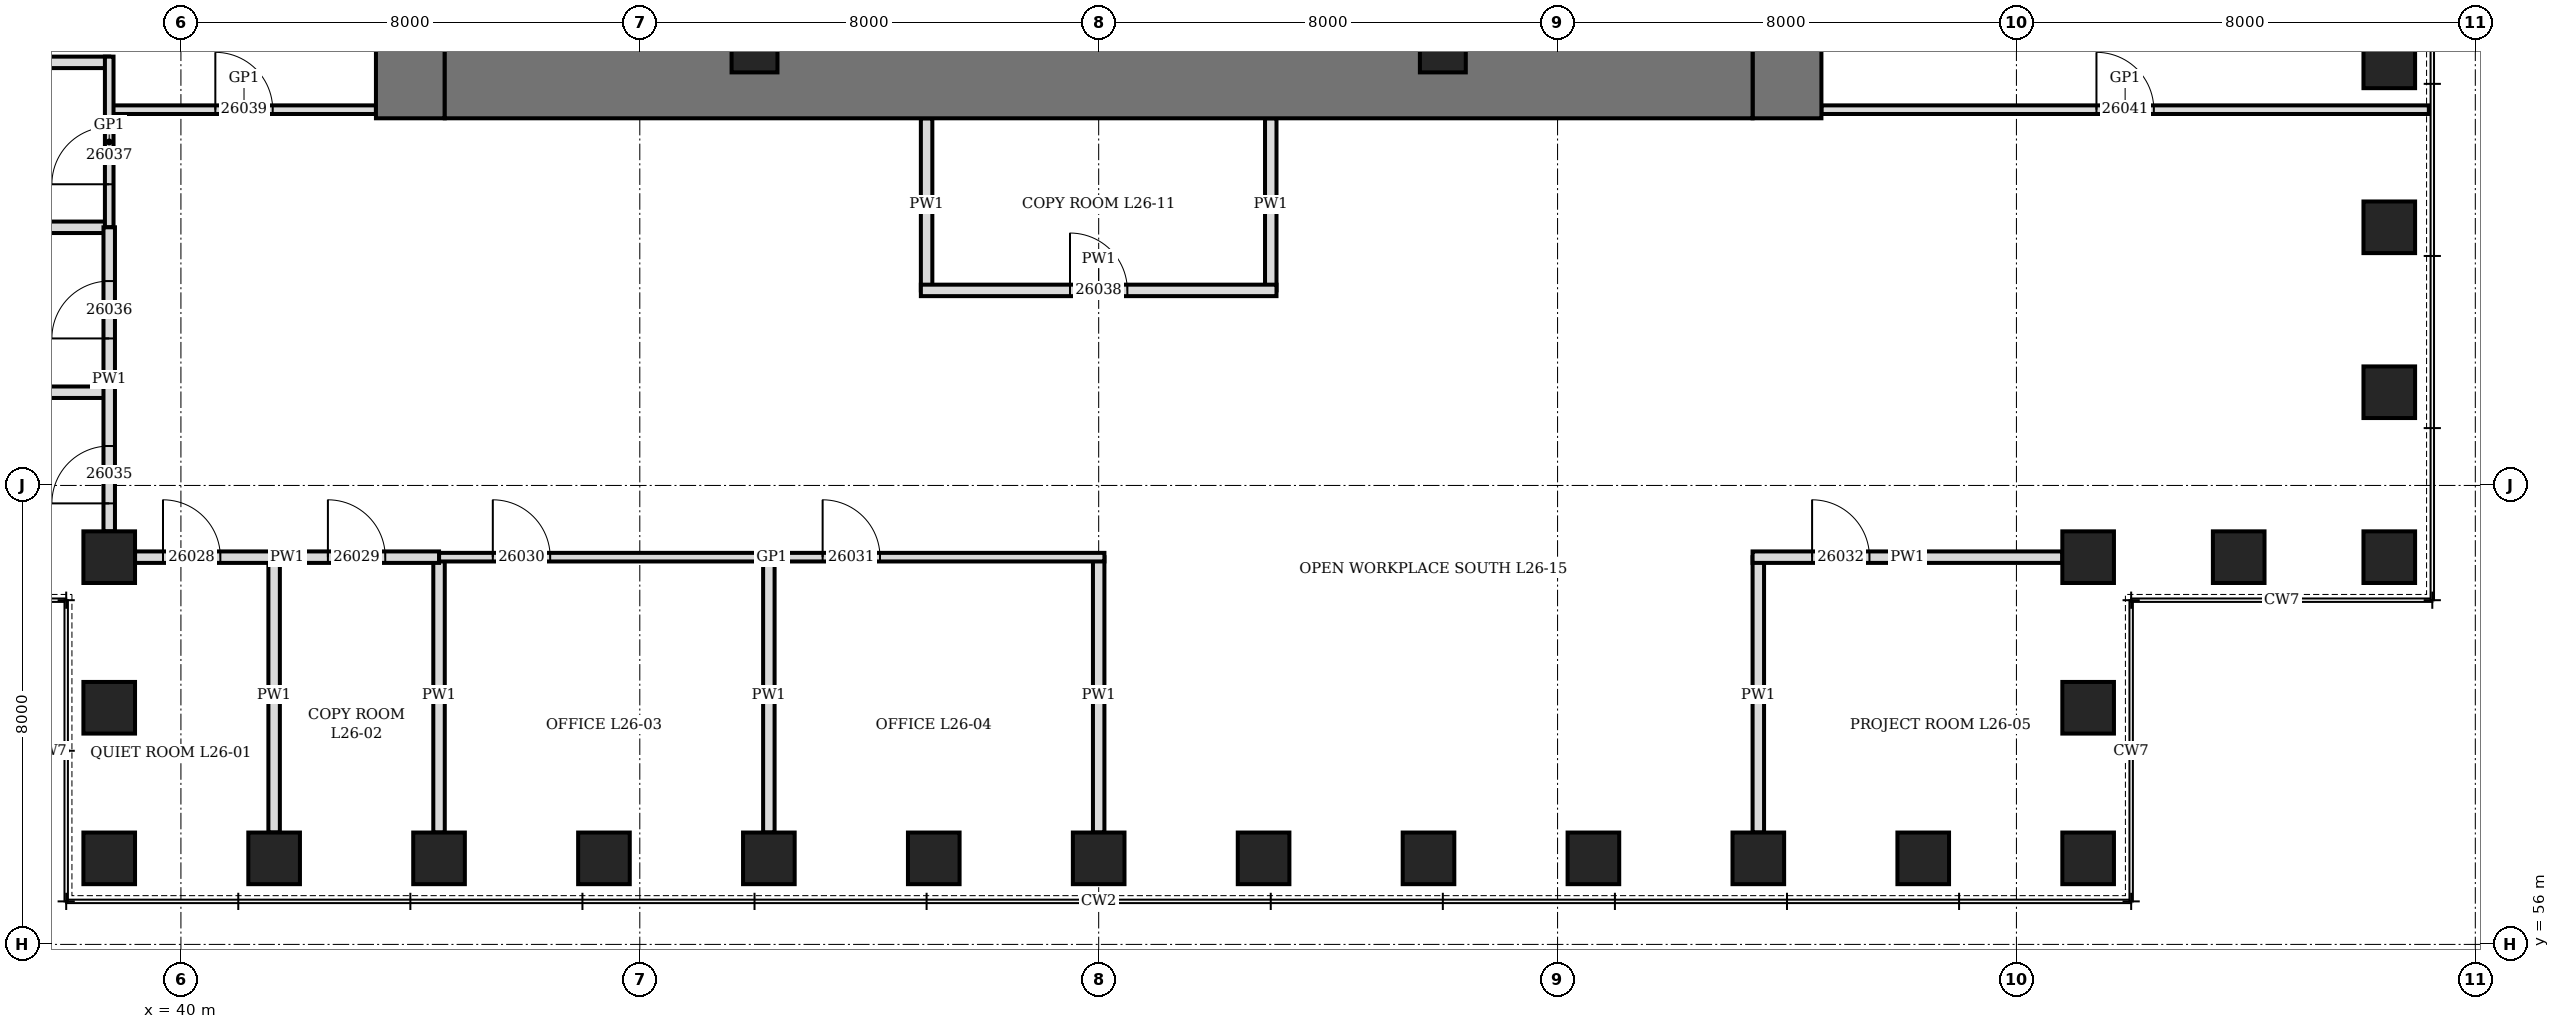
"""IFC4 building model, lengths in metres.
Left out: names, types, materials, properties, quantities, classifications, styles, units other than length and angle.
Written with IfcOpenShell. Run it as: python <this file> out.ifc"""

import sys

from ifc_helpers import new_model, si_unit, direction, frame, frame_2d, origin, origin_2d, place, context, subcontext, project, spatial, rectangle, hollow_rectangle, extrude, element, fill, save


model = new_model("IFC4")
c1 = context("Model", 3, precision=1e-05, world=origin(), true_north=direction((0.0, 1.0)))
c2 = subcontext(c1, "Body", "Model", "MODEL_VIEW")
j1 = project(units=[si_unit("LENGTHUNIT", "METRE"), si_unit("PLANEANGLEUNIT", "RADIAN")], contexts=[c1])
p1 = place(None, origin())
s1 = spatial("IfcSite", under=j1, at=p1, CompositionType="ELEMENT")
p2 = place(p1, origin())
s2 = spatial("IfcBuilding", under=s1, at=p2, CompositionType="ELEMENT")
p3 = place(p2, frame((0.0, 0.0, 120.7)))
s3 = spatial("IfcBuildingStorey", under=s2, at=p3, CompositionType="ELEMENT", Elevation=120.7)
for number, where, z_axis, x_axis in (
    (1, (38.75, 57.5, 0.0), (0.0, 0.0, 1.0), (1.0, 0.0, 0.0)),
    (2, (41.625, 57.5, 0.0), (0.0, 0.0, 1.0), (1.0, 0.0, 0.0)),
    (3, (44.5, 57.5, 0.0), (0.0, 0.0, 1.0), (1.0, 0.0, 0.0)),
    (4, (47.375, 57.5, 0.0), (0.0, 0.0, 1.0), (1.0, 0.0, 0.0)),
    (5, (50.25, 57.5, 0.0), (0.0, 0.0, 1.0), (1.0, 0.0, 0.0)),
    (6, (53.125, 57.5, 0.0), (0.0, 0.0, 1.0), (1.0, 0.0, 0.0)),
    (7, (56.0, 57.5, 0.0), (0.0, 0.0, 1.0), (1.0, 0.0, 0.0)),
    (8, (58.875, 57.5, 0.0), (0.0, 0.0, 1.0), (1.0, 0.0, 0.0)),
    (9, (61.75, 57.5, 0.0), (0.0, 0.0, 1.0), (1.0, 0.0, 0.0)),
    (10, (64.625, 57.5, 0.0), (0.0, 0.0, 1.0), (1.0, 0.0, 0.0)),
    (11, (67.5, 57.5, 0.0), (0.0, 0.0, 1.0), (1.0, 0.0, 0.0)),
    (12, (70.375, 57.5, 0.0), (0.0, 0.0, 1.0), (1.0, 0.0, 0.0)),
    (13, (73.25, 57.5, 0.0), (0.0, 0.0, 1.0), (0.0, 1.0, 0.0)),
    (14, (73.25, 60.125, 0.0), (0.0, 0.0, 1.0), (0.0, 1.0, 0.0)),
    (15, (73.25, 62.75, 0.0), (0.0, 0.0, 1.0), (1.0, 0.0, 0.0)),
    (16, (75.875, 62.75, 0.0), (0.0, 0.0, 1.0), (1.0, 0.0, 0.0)),
    (17, (78.5, 62.75, 0.0), (0.0, 0.0, 1.0), (0.0, 1.0, 0.0)),
    (18, (78.5, 65.625, 0.0), (0.0, 0.0, 1.0), (0.0, 1.0, 0.0)),
    (19, (78.5, 68.5, 0.0), (0.0, 0.0, 1.0), (0.0, 1.0, 0.0)),
    (20, (78.5, 71.375, 0.0), (0.0, 0.0, 1.0), (0.0, 1.0, 0.0)),
    (21, (38.75, 62.75, 0.0), (0.0, 0.0, 1.0), (0.0, 1.0, 0.0)),
    (22, (38.75, 60.125, 0.0), (0.0, 0.0, 1.0), (0.0, 1.0, 0.0)),
):
    element("IfcColumn", number, at=place(p3, frame(where, z_axis=z_axis, x_axis=x_axis)), inside=s3, PredefinedType="COLUMN", context=c2, shape_type="SweptSolid", body=[
        extrude(hollow_rectangle(XDim=0.9, YDim=0.9, WallThickness=0.15, at=origin_2d()), origin(), (0.0, 0.0, 1.0), 4.2),
    ])
p4 = place(p3, frame((44.0, 70.4, 0.0), z_axis=(0.0, 0.0, 1.0), x_axis=(0.0, 1.0, 0.0)))
e23 = element("IfcWall", 23, at=p4, inside=s3, PredefinedType="SHEAR", context=c2, shape_type="SweptSolid", body=[
    extrude(rectangle(XDim=19.2, YDim=1.2, at=frame_2d((9.6, 0.0))), origin(), (0.0, 0.0, 1.0), 4.2),
])
p5 = place(p4, frame((8.6, 0.0, 0.0)))
e24 = element("IfcOpeningElement", 24, at=p5, cuts=e23, PredefinedType="OPENING", context=c2, shape_type="SweptSolid", body=[
    extrude(rectangle(XDim=2.0, YDim=2.4, at=frame_2d((1.0, 1.2))), frame((0.0, 0.61, 0.0), z_axis=(0.0, -1.0, 0.0), x_axis=(1.0, 0.0, 0.0)), (0.0, 0.0, 1.0), 1.22),
])
p6 = place(p3, frame((68.0, 70.4, 0.0), z_axis=(0.0, 0.0, 1.0), x_axis=(0.0, 1.0, 0.0)))
e25 = element("IfcWall", 25, at=p6, inside=s3, PredefinedType="SHEAR", context=c2, shape_type="SweptSolid", body=[
    extrude(rectangle(XDim=19.2, YDim=1.2, at=frame_2d((9.6, 0.0))), origin(), (0.0, 0.0, 1.0), 4.2),
])
p7 = place(p6, frame((8.6, 0.0, 0.0)))
e26 = element("IfcOpeningElement", 26, at=p7, cuts=e25, PredefinedType="OPENING", context=c2, shape_type="SweptSolid", body=[
    extrude(rectangle(XDim=2.0, YDim=2.4, at=frame_2d((1.0, 1.2))), frame((0.0, 0.61, 0.0), z_axis=(0.0, -1.0, 0.0), x_axis=(1.0, 0.0, 0.0)), (0.0, 0.0, 1.0), 1.22),
])
p8 = place(p3, frame((44.6, 71.0, 0.0), z_axis=(0.0, 0.0, 1.0), x_axis=(1.0, 0.0, 0.0)))
e27 = element("IfcWall", 27, at=p8, inside=s3, PredefinedType="SHEAR", context=c2, shape_type="SweptSolid", body=[
    extrude(rectangle(XDim=22.8, YDim=1.2, at=frame_2d((11.4, 0.0))), origin(), (0.0, 0.0, 1.0), 4.2),
])
for number, where, z_axis, x_axis in (
    (28, (50.0, 71.6, 0.0), (0.0, 0.0, 1.0), (1.0, 0.0, 0.0)),
    (29, (62.0, 71.6, 0.0), (0.0, 0.0, 1.0), (1.0, 0.0, 0.0)),
):
    element("IfcColumn", number, at=place(p3, frame(where, z_axis=z_axis, x_axis=x_axis)), inside=s3, PredefinedType="COLUMN", context=c2, shape_type="SweptSolid", body=[
        extrude(hollow_rectangle(XDim=0.8, YDim=0.8, WallThickness=0.1, at=origin_2d()), origin(), (0.0, 0.0, 1.0), 4.2),
    ])
p9 = place(p3, frame((41.625, 57.95, 0.0), z_axis=(0.0, 0.0, 1.0), x_axis=(0.0, 1.0, 0.0)))
e30 = element("IfcWall", 30, at=p9, inside=s3, PredefinedType="PARTITIONING", context=c2, shape_type="SweptSolid", body=[
    extrude(rectangle(XDim=4.8, YDim=0.2, at=frame_2d((2.4, 0.0))), origin(), (0.0, 0.0, 1.0), 3.428),
])
p10 = place(p3, frame((44.5, 57.95, 0.0), z_axis=(0.0, 0.0, 1.0), x_axis=(0.0, 1.0, 0.0)))
e31 = element("IfcWall", 31, at=p10, inside=s3, PredefinedType="PARTITIONING", context=c2, shape_type="SweptSolid", body=[
    extrude(rectangle(XDim=4.8, YDim=0.2, at=frame_2d((2.4, 0.0))), origin(), (0.0, 0.0, 1.0), 2.74),
])
for number, where, z_axis, x_axis in (
    (32, (50.25, 57.95, 0.0), (0.0, 0.0, 1.0), (0.0, 1.0, 0.0)),
    (33, (56.0, 57.95, 0.0), (0.0, 0.0, 1.0), (0.0, 1.0, 0.0)),
):
    element("IfcWall", number, at=place(p3, frame(where, z_axis=z_axis, x_axis=x_axis)), inside=s3, PredefinedType="PARTITIONING", context=c2, shape_type="SweptSolid", body=[
        extrude(rectangle(XDim=4.8, YDim=0.2, at=frame_2d((2.4, 0.0))), origin(), (0.0, 0.0, 1.0), 3.278),
    ])
p11 = place(p3, frame((67.5, 57.95, 0.0), z_axis=(0.0, 0.0, 1.0), x_axis=(0.0, 1.0, 0.0)))
e34 = element("IfcWall", 34, at=p11, inside=s3, PredefinedType="PARTITIONING", context=c2, shape_type="SweptSolid", body=[
    extrude(rectangle(XDim=4.8, YDim=0.2, at=frame_2d((2.4, 0.0))), origin(), (0.0, 0.0, 1.0), 2.74),
])
for number, where, z_axis, x_axis in (
    (35, (33.95, 65.625, 0.0), (0.0, 0.0, 1.0), (1.0, 0.0, 0.0)),
    (36, (33.95, 68.5, 0.0), (0.0, 0.0, 1.0), (1.0, 0.0, 0.0)),
    (37, (33.95, 71.375, 0.0), (0.0, 0.0, 1.0), (1.0, 0.0, 0.0)),
):
    element("IfcWall", number, at=place(p3, frame(where, z_axis=z_axis, x_axis=x_axis)), inside=s3, PredefinedType="PARTITIONING", context=c2, shape_type="SweptSolid", body=[
        extrude(rectangle(XDim=4.8, YDim=0.2, at=frame_2d((2.4, 0.0))), origin(), (0.0, 0.0, 1.0), 3.428),
    ])
for number, where, z_axis, x_axis in (
    (38, (53.0, 67.4, 0.0), (0.0, 0.0, 1.0), (0.0, 1.0, 0.0)),
    (39, (59.0, 67.4, 0.0), (0.0, 0.0, 1.0), (0.0, 1.0, 0.0)),
):
    element("IfcWall", number, at=place(p3, frame(where, z_axis=z_axis, x_axis=x_axis)), inside=s3, PredefinedType="PARTITIONING", context=c2, shape_type="SweptSolid", body=[
        extrude(rectangle(XDim=3.0, YDim=0.2, at=frame_2d((1.5, 0.0))), origin(), (0.0, 0.0, 1.0), 3.278),
    ])
p12 = place(p3, frame((44.5, 62.75, 0.0), z_axis=(0.0, 0.0, 1.0), x_axis=(1.0, 0.0, 0.0)))
e40 = element("IfcWall", 40, at=p12, inside=s3, PredefinedType="PARTITIONING", context=c2, shape_type="SweptSolid", body=[
    extrude(rectangle(XDim=11.6, YDim=0.15, at=frame_2d((5.8, 0.0))), origin(), (0.0, 0.0, 1.0), 4.04),
])
p13 = place(p12, frame((0.938, 0.0, 0.0)))
e41 = element("IfcOpeningElement", 41, at=p13, cuts=e40, PredefinedType="OPENING", context=c2, shape_type="SweptSolid", body=[
    extrude(rectangle(XDim=1.0, YDim=2.1, at=frame_2d((0.5, 1.05))), frame((0.0, 0.085, 0.0), z_axis=(0.0, -1.0, 0.0), x_axis=(1.0, 0.0, 0.0)), (0.0, 0.0, 1.0), 0.17),
])
p14 = place(p12, frame((6.688, 0.0, 0.0)))
e42 = element("IfcOpeningElement", 42, at=p14, cuts=e40, PredefinedType="OPENING", context=c2, shape_type="SweptSolid", body=[
    extrude(rectangle(XDim=1.0, YDim=2.1, at=frame_2d((0.5, 1.05))), frame((0.0, 0.085, 0.0), z_axis=(0.0, -1.0, 0.0), x_axis=(1.0, 0.0, 0.0)), (0.0, 0.0, 1.0), 0.17),
])
p15 = place(p3, frame((39.2, 62.75, 0.0), z_axis=(0.0, 0.0, 1.0), x_axis=(1.0, 0.0, 0.0)))
e43 = element("IfcWall", 43, at=p15, inside=s3, PredefinedType="PARTITIONING", context=c2, shape_type="SweptSolid", body=[
    extrude(rectangle(XDim=5.3, YDim=0.2, at=frame_2d((2.65, 0.0))), origin(), (0.0, 0.0, 1.0), 4.04),
])
p16 = place(p15, frame((0.488, 0.0, 0.0)))
e44 = element("IfcOpeningElement", 44, at=p16, cuts=e43, PredefinedType="OPENING", context=c2, shape_type="SweptSolid", body=[
    extrude(rectangle(XDim=1.0, YDim=2.1, at=frame_2d((0.5, 1.05))), frame((0.0, 0.11, 0.0), z_axis=(0.0, -1.0, 0.0), x_axis=(1.0, 0.0, 0.0)), (0.0, 0.0, 1.0), 0.22),
])
p17 = place(p15, frame((3.363, 0.0, 0.0)))
e45 = element("IfcOpeningElement", 45, at=p17, cuts=e43, PredefinedType="OPENING", context=c2, shape_type="SweptSolid", body=[
    extrude(rectangle(XDim=1.0, YDim=2.1, at=frame_2d((0.5, 1.05))), frame((0.0, 0.11, 0.0), z_axis=(0.0, -1.0, 0.0), x_axis=(1.0, 0.0, 0.0)), (0.0, 0.0, 1.0), 0.22),
])
p18 = place(p3, frame((67.4, 62.75, 0.0), z_axis=(0.0, 0.0, 1.0), x_axis=(1.0, 0.0, 0.0)))
e46 = element("IfcWall", 46, at=p18, inside=s3, PredefinedType="PARTITIONING", context=c2, shape_type="SweptSolid", body=[
    extrude(rectangle(XDim=5.4, YDim=0.2, at=frame_2d((2.7, 0.0))), origin(), (0.0, 0.0, 1.0), 4.04),
])
p19 = place(p18, frame((1.038, 0.0, 0.0)))
e47 = element("IfcOpeningElement", 47, at=p19, cuts=e46, PredefinedType="OPENING", context=c2, shape_type="SweptSolid", body=[
    extrude(rectangle(XDim=1.0, YDim=2.1, at=frame_2d((0.5, 1.05))), frame((0.0, 0.11, 0.0), z_axis=(0.0, -1.0, 0.0), x_axis=(1.0, 0.0, 0.0)), (0.0, 0.0, 1.0), 0.22),
])
p20 = place(p3, frame((52.9, 67.4, 0.0), z_axis=(0.0, 0.0, 1.0), x_axis=(1.0, 0.0, 0.0)))
e48 = element("IfcWall", 48, at=p20, inside=s3, PredefinedType="PARTITIONING", context=c2, shape_type="SweptSolid", body=[
    extrude(rectangle(XDim=6.2, YDim=0.2, at=frame_2d((3.1, 0.0))), origin(), (0.0, 0.0, 1.0), 4.04),
])
p21 = place(p20, frame((2.6, 0.0, 0.0)))
e49 = element("IfcOpeningElement", 49, at=p21, cuts=e48, PredefinedType="OPENING", context=c2, shape_type="SweptSolid", body=[
    extrude(rectangle(XDim=1.0, YDim=2.1, at=frame_2d((0.5, 1.05))), frame((0.0, 0.11, 0.0), z_axis=(0.0, -1.0, 0.0), x_axis=(1.0, 0.0, 0.0)), (0.0, 0.0, 1.0), 0.22),
])
p22 = place(p3, frame((38.8, 70.55, 0.0), z_axis=(0.0, 0.0, 1.0), x_axis=(1.0, 0.0, 0.0)))
e50 = element("IfcWall", 50, at=p22, inside=s3, PredefinedType="PARTITIONING", context=c2, shape_type="SweptSolid", body=[
    extrude(rectangle(XDim=4.6, YDim=0.15, at=frame_2d((2.3, 0.0))), origin(), (0.0, 0.0, 1.0), 4.04),
])
p23 = place(p22, frame((1.8, 0.0, 0.0)))
e51 = element("IfcOpeningElement", 51, at=p23, cuts=e50, PredefinedType="OPENING", context=c2, shape_type="SweptSolid", body=[
    extrude(rectangle(XDim=1.0, YDim=2.4, at=frame_2d((0.5, 1.2))), frame((0.0, 0.085, 0.0), z_axis=(0.0, -1.0, 0.0), x_axis=(1.0, 0.0, 0.0)), (0.0, 0.0, 1.0), 0.17),
])
p24 = place(p3, frame((68.6, 70.55, 0.0), z_axis=(0.0, 0.0, 1.0), x_axis=(1.0, 0.0, 0.0)))
e52 = element("IfcWall", 52, at=p24, inside=s3, PredefinedType="PARTITIONING", context=c2, shape_type="SweptSolid", body=[
    extrude(rectangle(XDim=10.59, YDim=0.15, at=frame_2d((5.295, 0.0))), origin(), (0.0, 0.0, 1.0), 4.04),
])
p25 = place(p24, frame((4.795, 0.0, 0.0)))
e53 = element("IfcOpeningElement", 53, at=p25, cuts=e52, PredefinedType="OPENING", context=c2, shape_type="SweptSolid", body=[
    extrude(rectangle(XDim=1.0, YDim=2.4, at=frame_2d((0.5, 1.2))), frame((0.0, 0.085, 0.0), z_axis=(0.0, -1.0, 0.0), x_axis=(1.0, 0.0, 0.0)), (0.0, 0.0, 1.0), 0.17),
])
p26 = place(p3, frame((38.75, 68.5, 0.0), z_axis=(0.0, 0.0, 1.0), x_axis=(0.0, 1.0, 0.0)))
e54 = element("IfcWall", 54, at=p26, inside=s3, PredefinedType="PARTITIONING", context=c2, shape_type="SweptSolid", body=[
    extrude(rectangle(XDim=2.975, YDim=0.15, at=frame_2d((1.488, 0.0))), origin(), (0.0, 0.0, 1.0), 4.04),
])
p27 = place(p26, frame((0.75, 0.0, 0.0)))
e55 = element("IfcOpeningElement", 55, at=p27, cuts=e54, PredefinedType="OPENING", context=c2, shape_type="SweptSolid", body=[
    extrude(rectangle(XDim=1.0, YDim=2.4, at=frame_2d((0.5, 1.2))), frame((0.0, 0.085, 0.0), z_axis=(0.0, -1.0, 0.0), x_axis=(1.0, 0.0, 0.0)), (0.0, 0.0, 1.0), 0.17),
])
p28 = place(p3, frame((38.75, 63.2, 0.0), z_axis=(0.0, 0.0, 1.0), x_axis=(0.0, 1.0, 0.0)))
e56 = element("IfcWall", 56, at=p28, inside=s3, PredefinedType="PARTITIONING", context=c2, shape_type="SweptSolid", body=[
    extrude(rectangle(XDim=5.3, YDim=0.2, at=frame_2d((2.65, 0.0))), origin(), (0.0, 0.0, 1.0), 4.04),
])
p29 = place(p28, frame((0.488, 0.0, 0.0)))
e57 = element("IfcOpeningElement", 57, at=p29, cuts=e56, PredefinedType="OPENING", context=c2, shape_type="SweptSolid", body=[
    extrude(rectangle(XDim=1.0, YDim=2.1, at=frame_2d((0.5, 1.05))), frame((0.0, 0.11, 0.0), z_axis=(0.0, -1.0, 0.0), x_axis=(1.0, 0.0, 0.0)), (0.0, 0.0, 1.0), 0.22),
])
p30 = place(p28, frame((3.363, 0.0, 0.0)))
e58 = element("IfcOpeningElement", 58, at=p30, cuts=e56, PredefinedType="OPENING", context=c2, shape_type="SweptSolid", body=[
    extrude(rectangle(XDim=1.0, YDim=2.1, at=frame_2d((0.5, 1.05))), frame((0.0, 0.11, 0.0), z_axis=(0.0, -1.0, 0.0), x_axis=(1.0, 0.0, 0.0)), (0.0, 0.0, 1.0), 0.22),
])
p31 = place(p16, origin())
e59 = element("IfcDoor", 59, at=p31, inside=s3, OperationType="SINGLE_SWING_LEFT", PredefinedType="DOOR", context=c2, shape_type="SweptSolid", body=[
    extrude(rectangle(XDim=1.0, YDim=2.1, at=frame_2d((0.5, 1.05))), frame((0.0, 0.1, 0.0), z_axis=(0.0, -1.0, 0.0), x_axis=(1.0, 0.0, 0.0)), (0.0, 0.0, 1.0), 0.199),
])
fill(e44, e59)
p32 = place(p17, origin())
e60 = element("IfcDoor", 60, at=p32, inside=s3, OperationType="SINGLE_SWING_LEFT", PredefinedType="DOOR", context=c2, shape_type="SweptSolid", body=[
    extrude(rectangle(XDim=1.0, YDim=2.1, at=frame_2d((0.5, 1.05))), frame((0.0, 0.1, 0.0), z_axis=(0.0, -1.0, 0.0), x_axis=(1.0, 0.0, 0.0)), (0.0, 0.0, 1.0), 0.199),
])
fill(e45, e60)
p33 = place(p13, origin())
e61 = element("IfcDoor", 61, at=p33, inside=s3, OperationType="SINGLE_SWING_LEFT", PredefinedType="DOOR", context=c2, shape_type="SweptSolid", body=[
    extrude(rectangle(XDim=1.0, YDim=2.1, at=frame_2d((0.5, 1.05))), frame((0.0, 0.075, 0.0), z_axis=(0.0, -1.0, 0.0), x_axis=(1.0, 0.0, 0.0)), (0.0, 0.0, 1.0), 0.149),
])
fill(e41, e61)
p34 = place(p14, origin())
e62 = element("IfcDoor", 62, at=p34, inside=s3, OperationType="SINGLE_SWING_LEFT", PredefinedType="DOOR", context=c2, shape_type="SweptSolid", body=[
    extrude(rectangle(XDim=1.0, YDim=2.1, at=frame_2d((0.5, 1.05))), frame((0.0, 0.075, 0.0), z_axis=(0.0, -1.0, 0.0), x_axis=(1.0, 0.0, 0.0)), (0.0, 0.0, 1.0), 0.149),
])
fill(e42, e62)
p35 = place(p19, origin())
e63 = element("IfcDoor", 63, at=p35, inside=s3, OperationType="SINGLE_SWING_LEFT", PredefinedType="DOOR", context=c2, shape_type="SweptSolid", body=[
    extrude(rectangle(XDim=1.0, YDim=2.1, at=frame_2d((0.5, 1.05))), frame((0.0, 0.1, 0.0), z_axis=(0.0, -1.0, 0.0), x_axis=(1.0, 0.0, 0.0)), (0.0, 0.0, 1.0), 0.199),
])
fill(e47, e63)
p36 = place(p29, origin())
e64 = element("IfcDoor", 64, at=p36, inside=s3, OperationType="SINGLE_SWING_LEFT", PredefinedType="DOOR", context=c2, shape_type="SweptSolid", body=[
    extrude(rectangle(XDim=1.0, YDim=2.1, at=frame_2d((0.5, 1.05))), frame((0.0, 0.1, 0.0), z_axis=(0.0, -1.0, 0.0), x_axis=(1.0, 0.0, 0.0)), (0.0, 0.0, 1.0), 0.199),
])
fill(e57, e64)
p37 = place(p30, origin())
e65 = element("IfcDoor", 65, at=p37, inside=s3, OperationType="SINGLE_SWING_LEFT", PredefinedType="DOOR", context=c2, shape_type="SweptSolid", body=[
    extrude(rectangle(XDim=1.0, YDim=2.1, at=frame_2d((0.5, 1.05))), frame((0.0, 0.1, 0.0), z_axis=(0.0, -1.0, 0.0), x_axis=(1.0, 0.0, 0.0)), (0.0, 0.0, 1.0), 0.199),
])
fill(e58, e65)
p38 = place(p27, origin())
e66 = element("IfcDoor", 66, at=p38, inside=s3, OperationType="SINGLE_SWING_RIGHT", PredefinedType="DOOR", context=c2, shape_type="SweptSolid", body=[
    extrude(rectangle(XDim=1.0, YDim=2.4, at=frame_2d((0.5, 1.2))), frame((0.0, 0.075, 0.0), z_axis=(0.0, -1.0, 0.0), x_axis=(1.0, 0.0, 0.0)), (0.0, 0.0, 1.0), 0.149),
])
fill(e55, e66)
p39 = place(p21, origin())
e67 = element("IfcDoor", 67, at=p39, inside=s3, OperationType="SINGLE_SWING_LEFT", PredefinedType="DOOR", context=c2, shape_type="SweptSolid", body=[
    extrude(rectangle(XDim=1.0, YDim=2.1, at=frame_2d((0.5, 1.05))), frame((0.0, 0.1, 0.0), z_axis=(0.0, -1.0, 0.0), x_axis=(1.0, 0.0, 0.0)), (0.0, 0.0, 1.0), 0.199),
])
fill(e49, e67)
p40 = place(p23, origin())
e68 = element("IfcDoor", 68, at=p40, inside=s3, OperationType="SINGLE_SWING_RIGHT", PredefinedType="DOOR", context=c2, shape_type="SweptSolid", body=[
    extrude(rectangle(XDim=1.0, YDim=2.4, at=frame_2d((0.5, 1.2))), frame((0.0, 0.075, 0.0), z_axis=(0.0, -1.0, 0.0), x_axis=(1.0, 0.0, 0.0)), (0.0, 0.0, 1.0), 0.149),
])
fill(e51, e68)
p41 = place(p25, origin())
e69 = element("IfcDoor", 69, at=p41, inside=s3, OperationType="SINGLE_SWING_RIGHT", PredefinedType="DOOR", context=c2, shape_type="SweptSolid", body=[
    extrude(rectangle(XDim=1.0, YDim=2.4, at=frame_2d((0.5, 1.2))), frame((0.0, 0.075, 0.0), z_axis=(0.0, -1.0, 0.0), x_axis=(1.0, 0.0, 0.0)), (0.0, 0.0, 1.0), 0.149),
])
fill(e53, e69)
save(model, sys.argv[1])
